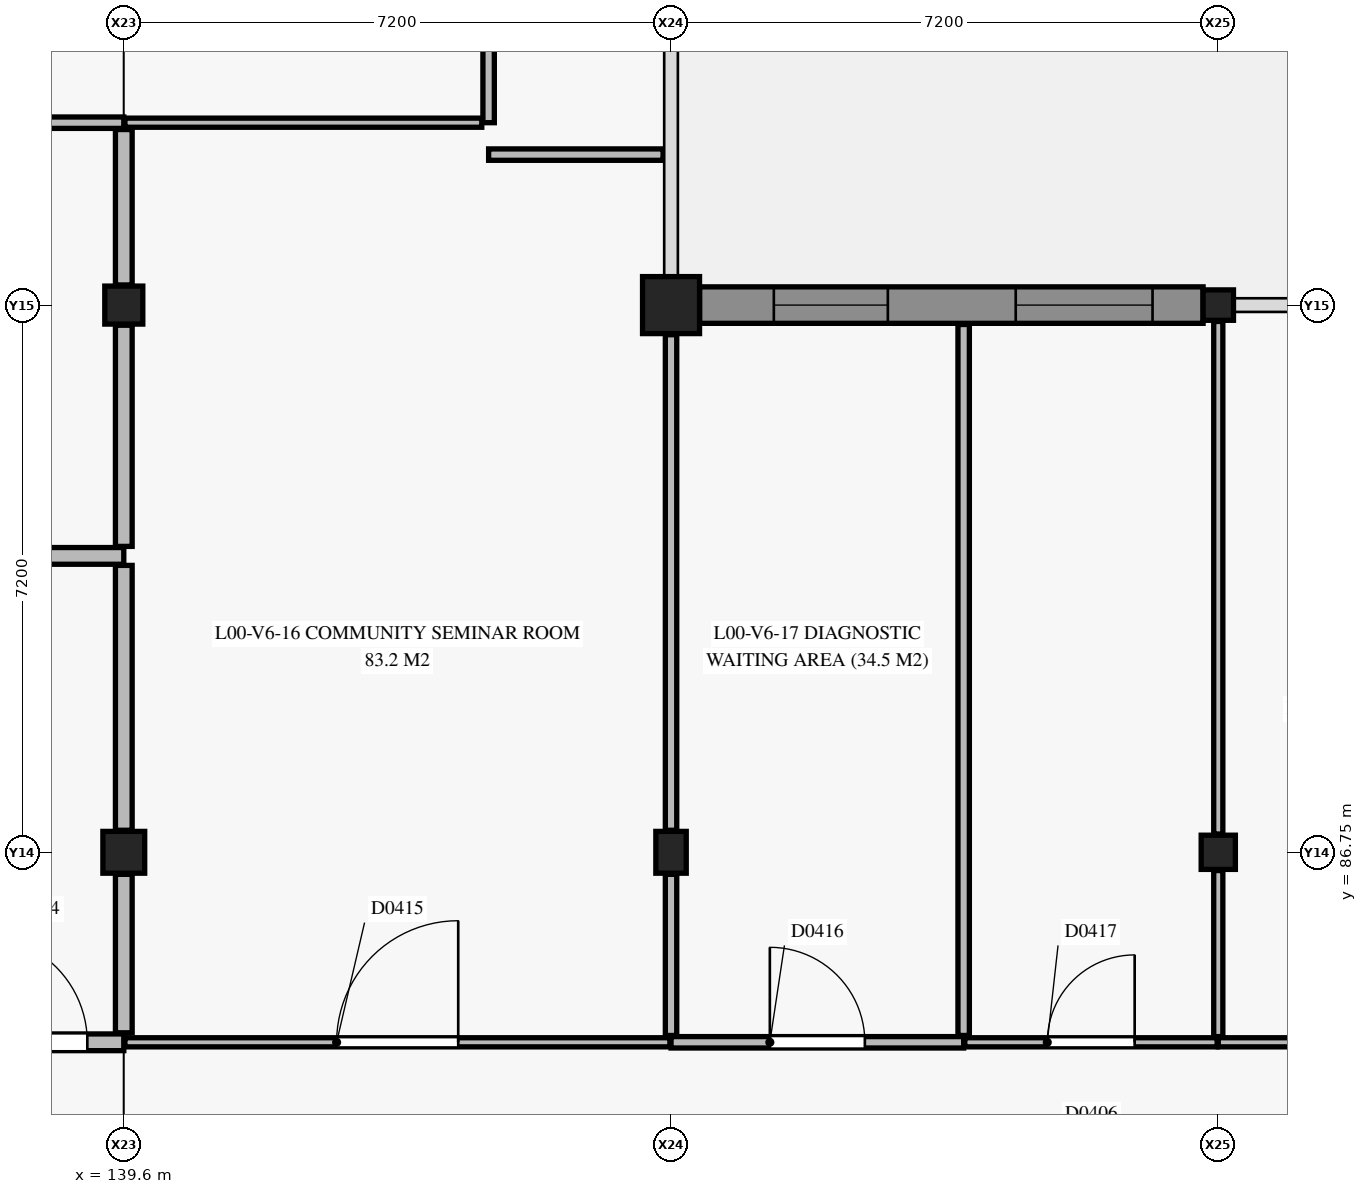
"""IFC4 building model, lengths in metres.
Left out: names, types, materials, properties, quantities, classifications, styles, units other than length and angle.
Written with IfcOpenShell. Run it as: python <this file> out.ifc"""

import sys

from ifc_helpers import new_model, si_unit, direction, frame, frame_2d, origin, origin_2d, place, context, subcontext, project, spatial, rectangle, extrude, element, fill, save


model = new_model("IFC4")
c1 = context("Model", 3, precision=1e-05, world=origin(), true_north=direction((0.0, 1.0)))
c2 = subcontext(c1, "Body", "Model", "MODEL_VIEW")
j1 = project(units=[si_unit("LENGTHUNIT", "METRE"), si_unit("PLANEANGLEUNIT", "RADIAN")], contexts=[c1])
p1 = place(None, origin())
s1 = spatial("IfcSite", under=j1, at=p1, CompositionType="ELEMENT")
p2 = place(p1, origin())
s2 = spatial("IfcBuilding", under=s1, at=p2, CompositionType="ELEMENT")
p3 = place(p2, origin())
s3 = spatial("IfcBuildingStorey", under=s2, at=p3, CompositionType="ELEMENT", Elevation=0.0)
p4 = place(p3, frame((139.6, 86.75, 0.0), z_axis=(0.0, 0.0, 1.0), x_axis=(1.0, 0.0, 0.0)))
e1 = element("IfcColumn", 1, at=p4, inside=s3, PredefinedType="COLUMN", context=c2, shape_type="SweptSolid", body=[
    extrude(rectangle(XDim=0.55, YDim=0.55, at=origin_2d()), origin(), (0.0, 0.0, 1.0), 4.8),
])
p5 = place(p3, frame((139.6, 93.95, 0.0), z_axis=(0.0, 0.0, 1.0), x_axis=(1.0, 0.0, 0.0)))
e2 = element("IfcColumn", 2, at=p5, inside=s3, PredefinedType="COLUMN", context=c2, shape_type="SweptSolid", body=[
    extrude(rectangle(XDim=0.5, YDim=0.5, at=origin_2d()), origin(), (0.0, 0.0, 1.0), 4.8),
])
p6 = place(p3, frame((146.8, 86.75, 0.0), z_axis=(0.0, 0.0, 1.0), x_axis=(1.0, 0.0, 0.0)))
e3 = element("IfcColumn", 3, at=p6, inside=s3, PredefinedType="COLUMN", context=c2, shape_type="SweptSolid", body=[
    extrude(rectangle(XDim=0.4, YDim=0.55, at=origin_2d()), origin(), (0.0, 0.0, 1.0), 4.8),
])
p7 = place(p3, frame((146.8, 93.95, 0.0), z_axis=(0.0, 0.0, 1.0), x_axis=(1.0, 0.0, 0.0)))
e4 = element("IfcColumn", 4, at=p7, inside=s3, PredefinedType="COLUMN", context=c2, shape_type="SweptSolid", body=[
    extrude(rectangle(XDim=0.75, YDim=0.75, at=origin_2d()), origin(), (0.0, 0.0, 1.0), 4.8),
])
p8 = place(p3, frame((154.0, 86.75, 0.0), z_axis=(0.0, 0.0, 1.0), x_axis=(1.0, 0.0, 0.0)))
e5 = element("IfcColumn", 5, at=p8, inside=s3, PredefinedType="COLUMN", context=c2, shape_type="SweptSolid", body=[
    extrude(rectangle(XDim=0.45, YDim=0.45, at=origin_2d()), origin(), (0.0, 0.0, 1.0), 4.8),
])
p9 = place(p3, frame((154.0, 93.95, 0.0), z_axis=(0.0, 0.0, 1.0), x_axis=(1.0, 0.0, 0.0)))
e6 = element("IfcColumn", 6, at=p9, inside=s3, PredefinedType="COLUMN", context=c2, shape_type="SweptSolid", body=[
    extrude(rectangle(XDim=0.4, YDim=0.4, at=origin_2d()), origin(), (0.0, 0.0, 1.0), 4.8),
])
p10 = place(p3, frame((147.175, 93.95, 0.0), z_axis=(0.0, 0.0, 1.0), x_axis=(1.0, 0.0, 0.0)))
e7 = element("IfcWall", 7, at=p10, inside=s3, PredefinedType="SOLIDWALL", context=c2, shape_type="SweptSolid", body=[
    extrude(rectangle(XDim=6.625, YDim=0.48, at=frame_2d((3.312, 0.0))), origin(), (0.0, 0.0, 1.0), 3.7),
])
p11 = place(p10, frame((0.978, 0.0, 0.9)))
e8 = element("IfcOpeningElement", 8, at=p11, cuts=e7, PredefinedType="OPENING", context=c2, shape_type="SweptSolid", body=[
    extrude(rectangle(XDim=1.5, YDim=1.5, at=frame_2d((0.75, 0.75))), frame((0.0, 0.25, 0.0), z_axis=(0.0, -1.0, 0.0), x_axis=(1.0, 0.0, 0.0)), (0.0, 0.0, 1.0), 0.5),
])
p12 = place(p10, frame((4.16, 0.0, 0.9)))
e9 = element("IfcOpeningElement", 9, at=p12, cuts=e7, PredefinedType="OPENING", context=c2, shape_type="SweptSolid", body=[
    extrude(rectangle(XDim=1.8, YDim=1.5, at=frame_2d((0.9, 0.75))), frame((0.0, 0.25, 0.0), z_axis=(0.0, -1.0, 0.0), x_axis=(1.0, 0.0, 0.0)), (0.0, 0.0, 1.0), 0.5),
])
p13 = place(p3, frame((137.24, 84.25, 0.0), z_axis=(0.0, 0.0, 1.0), x_axis=(1.0, 0.0, 0.0)))
e10 = element("IfcWall", 10, at=p13, inside=s3, PredefinedType="PARTITIONING", context=c2, shape_type="SweptSolid", body=[
    extrude(rectangle(XDim=2.36, YDim=0.22, at=frame_2d((1.18, 0.0))), origin(), (0.0, 0.0, 1.0), 3.805),
])
p14 = place(p13, frame((0.48, 0.0, 0.0)))
e11 = element("IfcOpeningElement", 11, at=p14, cuts=e10, PredefinedType="OPENING", context=c2, shape_type="SweptSolid", body=[
    extrude(rectangle(XDim=1.4, YDim=2.2, at=frame_2d((0.7, 1.1))), frame((0.0, 0.12, 0.0), z_axis=(0.0, -1.0, 0.0), x_axis=(1.0, 0.0, 0.0)), (0.0, 0.0, 1.0), 0.24),
])
p15 = place(p3, frame((146.8, 84.25, 0.0), z_axis=(0.0, 0.0, 1.0), x_axis=(1.0, 0.0, 0.0)))
e12 = element("IfcWall", 12, at=p15, inside=s3, PredefinedType="PARTITIONING", context=c2, shape_type="SweptSolid", body=[
    extrude(rectangle(XDim=3.85, YDim=0.15, at=frame_2d((1.925, 0.0))), origin(), (0.0, 0.0, 1.0), 3.955),
])
p16 = place(p15, frame((1.3, 0.0, 0.0)))
e13 = element("IfcOpeningElement", 13, at=p16, cuts=e12, PredefinedType="OPENING", context=c2, shape_type="SweptSolid", body=[
    extrude(rectangle(XDim=1.25, YDim=2.15, at=frame_2d((0.625, 1.075))), frame((0.0, 0.085, 0.0), z_axis=(0.0, -1.0, 0.0), x_axis=(1.0, 0.0, 0.0)), (0.0, 0.0, 1.0), 0.17),
])
p17 = place(p3, frame((132.4, 96.35, 0.0), z_axis=(0.0, 0.0, 1.0), x_axis=(1.0, 0.0, 0.0)))
e14 = element("IfcWall", 14, at=p17, inside=s3, PredefinedType="PARTITIONING", context=c2, shape_type="SweptSolid", body=[
    extrude(rectangle(XDim=7.2, YDim=0.15, at=frame_2d((3.6, 0.0))), origin(), (0.0, 0.0, 1.0), 3.705),
])
p18 = place(p17, frame((3.125, 0.0, 0.0)))
e15 = element("IfcOpeningElement", 15, at=p18, cuts=e14, PredefinedType="OPENING", context=c2, shape_type="SweptSolid", body=[
    extrude(rectangle(XDim=0.95, YDim=2.1, at=frame_2d((0.475, 1.05))), frame((0.0, 0.085, 0.0), z_axis=(0.0, -1.0, 0.0), x_axis=(1.0, 0.0, 0.0)), (0.0, 0.0, 1.0), 0.17),
])
p19 = place(p3, frame((144.4, 96.35, 0.0), z_axis=(0.0, 0.0, 1.0), x_axis=(0.0, 1.0, 0.0)))
e16 = element("IfcWall", 16, at=p19, inside=s3, PredefinedType="PARTITIONING", context=c2, shape_type="SweptSolid", body=[
    extrude(rectangle(XDim=2.4, YDim=0.15, at=frame_2d((1.2, 0.0))), origin(), (0.0, 0.0, 1.0), 4.045),
])
p20 = place(p3, frame((154.0, 84.25, 0.0), z_axis=(0.0, 0.0, 1.0), x_axis=(1.0, 0.0, 0.0)))
e17 = element("IfcWall", 17, at=p20, inside=s3, PredefinedType="PARTITIONING", context=c2, shape_type="SweptSolid", body=[
    extrude(rectangle(XDim=4.8, YDim=0.12, at=frame_2d((2.4, 0.0))), origin(), (0.0, 0.0, 1.0), 3.925),
])
p21 = place(p20, frame((1.9, 0.0, 0.0)))
e18 = element("IfcOpeningElement", 18, at=p21, cuts=e17, PredefinedType="OPENING", context=c2, shape_type="SweptSolid", body=[
    extrude(rectangle(XDim=1.0, YDim=2.15, at=frame_2d((0.5, 1.075))), frame((0.0, 0.07, 0.0), z_axis=(0.0, -1.0, 0.0), x_axis=(1.0, 0.0, 0.0)), (0.0, 0.0, 1.0), 0.14),
])
p22 = place(p3, frame((139.615, 84.25, 0.0), z_axis=(0.0, 0.0, 1.0), x_axis=(1.0, 0.0, 0.0)))
e19 = element("IfcWall", 19, at=p22, inside=s3, PredefinedType="PARTITIONING", context=c2, shape_type="SweptSolid", body=[
    extrude(rectangle(XDim=7.17, YDim=0.12, at=frame_2d((3.585, 0.0))), origin(), (0.0, 0.0, 1.0), 3.805),
])
p23 = place(p22, frame((2.785, 0.0, 0.0)))
e20 = element("IfcOpeningElement", 20, at=p23, cuts=e19, PredefinedType="OPENING", context=c2, shape_type="SweptSolid", body=[
    extrude(rectangle(XDim=1.6, YDim=2.25, at=frame_2d((0.8, 1.125))), frame((0.0, 0.07, 0.0), z_axis=(0.0, -1.0, 0.0), x_axis=(1.0, 0.0, 0.0)), (0.0, 0.0, 1.0), 0.14),
])
p24 = place(p3, frame((139.615, 96.35, 0.0), z_axis=(0.0, 0.0, 1.0), x_axis=(1.0, 0.0, 0.0)))
e21 = element("IfcWall", 21, at=p24, inside=s3, PredefinedType="PARTITIONING", context=c2, shape_type="SweptSolid", body=[
    extrude(rectangle(XDim=4.695, YDim=0.12, at=frame_2d((2.348, 0.0))), origin(), (0.0, 0.0, 1.0), 3.925),
])
p25 = place(p3, frame((150.665, 84.25, 0.0), z_axis=(0.0, 0.0, 1.0), x_axis=(1.0, 0.0, 0.0)))
e22 = element("IfcWall", 22, at=p25, inside=s3, PredefinedType="PARTITIONING", context=c2, shape_type="SweptSolid", body=[
    extrude(rectangle(XDim=3.32, YDim=0.12, at=frame_2d((1.66, 0.0))), origin(), (0.0, 0.0, 1.0), 3.925),
])
p26 = place(p25, frame((1.085, 0.0, 0.0)))
e23 = element("IfcOpeningElement", 23, at=p26, cuts=e22, PredefinedType="OPENING", context=c2, shape_type="SweptSolid", body=[
    extrude(rectangle(XDim=1.15, YDim=2.15, at=frame_2d((0.575, 1.075))), frame((0.0, 0.07, 0.0), z_axis=(0.0, -1.0, 0.0), x_axis=(1.0, 0.0, 0.0)), (0.0, 0.0, 1.0), 0.14),
])
p27 = place(p3, frame((137.24, 90.65, 0.0), z_axis=(0.0, 0.0, 1.0), x_axis=(1.0, 0.0, 0.0)))
e24 = element("IfcWall", 24, at=p27, inside=s3, PredefinedType="PARTITIONING", context=c2, shape_type="SweptSolid", body=[
    extrude(rectangle(XDim=2.36, YDim=0.22, at=frame_2d((1.18, 0.0))), origin(), (0.0, 0.0, 1.0), 3.925),
])
p28 = place(p3, frame((139.6, 84.375, 0.0), z_axis=(0.0, 0.0, 1.0), x_axis=(0.0, 1.0, 0.0)))
e25 = element("IfcWall", 25, at=p28, inside=s3, PredefinedType="PARTITIONING", context=c2, shape_type="SweptSolid", body=[
    extrude(rectangle(XDim=2.085, YDim=0.22, at=frame_2d((1.042, 0.0))), origin(), (0.0, 0.0, 1.0), 3.805),
])
p29 = place(p3, frame((139.6, 87.04, 0.0), z_axis=(0.0, 0.0, 1.0), x_axis=(0.0, 1.0, 0.0)))
e26 = element("IfcWall", 26, at=p29, inside=s3, PredefinedType="PARTITIONING", context=c2, shape_type="SweptSolid", body=[
    extrude(rectangle(XDim=3.485, YDim=0.22, at=frame_2d((1.742, 0.0))), origin(), (0.0, 0.0, 1.0), 3.925),
])
p30 = place(p3, frame((139.6, 90.775, 0.0), z_axis=(0.0, 0.0, 1.0), x_axis=(0.0, 1.0, 0.0)))
e27 = element("IfcWall", 27, at=p30, inside=s3, PredefinedType="PARTITIONING", context=c2, shape_type="SweptSolid", body=[
    extrude(rectangle(XDim=2.91, YDim=0.22, at=frame_2d((1.455, 0.0))), origin(), (0.0, 0.0, 1.0), 3.925),
])
p31 = place(p3, frame((139.6, 94.215, 0.0), z_axis=(0.0, 0.0, 1.0), x_axis=(0.0, 1.0, 0.0)))
e28 = element("IfcWall", 28, at=p31, inside=s3, PredefinedType="PARTITIONING", context=c2, shape_type="SweptSolid", body=[
    extrude(rectangle(XDim=2.045, YDim=0.22, at=frame_2d((1.022, 0.0))), origin(), (0.0, 0.0, 1.0), 3.925),
])
p32 = place(p3, frame((146.8, 84.34, 0.0), z_axis=(0.0, 0.0, 1.0), x_axis=(0.0, 1.0, 0.0)))
e29 = element("IfcWall", 29, at=p32, inside=s3, PredefinedType="PARTITIONING", context=c2, shape_type="SweptSolid", body=[
    extrude(rectangle(XDim=2.12, YDim=0.15, at=frame_2d((1.06, 0.0))), origin(), (0.0, 0.0, 1.0), 3.955),
])
p33 = place(p3, frame((146.8, 87.04, 0.0), z_axis=(0.0, 0.0, 1.0), x_axis=(0.0, 1.0, 0.0)))
e30 = element("IfcWall", 30, at=p33, inside=s3, PredefinedType="PARTITIONING", context=c2, shape_type="SweptSolid", body=[
    extrude(rectangle(XDim=6.52, YDim=0.15, at=frame_2d((3.26, 0.0))), origin(), (0.0, 0.0, 1.0), 3.705),
])
p34 = place(p3, frame((144.4, 95.93, 0.0), z_axis=(0.0, 0.0, 1.0), x_axis=(1.0, 0.0, 0.0)))
e31 = element("IfcWall", 31, at=p34, inside=s3, PredefinedType="PARTITIONING", context=c2, shape_type="SweptSolid", body=[
    extrude(rectangle(XDim=2.295, YDim=0.15, at=frame_2d((1.147, 0.0))), origin(), (0.0, 0.0, 1.0), 3.805),
])
p35 = place(p3, frame((150.65, 84.34, 0.0), z_axis=(0.0, 0.0, 1.0), x_axis=(0.0, 1.0, 0.0)))
e32 = element("IfcWall", 32, at=p35, inside=s3, PredefinedType="PARTITIONING", context=c2, shape_type="SweptSolid", body=[
    extrude(rectangle(XDim=9.355, YDim=0.15, at=frame_2d((4.677, 0.0))), origin(), (0.0, 0.0, 1.0), 3.705),
])
p36 = place(p3, frame((154.0, 84.325, 0.0), z_axis=(0.0, 0.0, 1.0), x_axis=(0.0, 1.0, 0.0)))
e33 = element("IfcWall", 33, at=p36, inside=s3, PredefinedType="PARTITIONING", context=c2, shape_type="SweptSolid", body=[
    extrude(rectangle(XDim=2.185, YDim=0.12, at=frame_2d((1.093, 0.0))), origin(), (0.0, 0.0, 1.0), 3.925),
])
p37 = place(p3, frame((154.0, 86.99, 0.0), z_axis=(0.0, 0.0, 1.0), x_axis=(0.0, 1.0, 0.0)))
e34 = element("IfcWall", 34, at=p37, inside=s3, PredefinedType="PARTITIONING", context=c2, shape_type="SweptSolid", body=[
    extrude(rectangle(XDim=6.745, YDim=0.12, at=frame_2d((3.373, 0.0))), origin(), (0.0, 0.0, 1.0), 3.925),
])
p38 = place(p11, origin())
e35 = element("IfcWindow", 35, at=p38, inside=s3, PartitioningType="SINGLE_PANEL", PredefinedType="WINDOW", context=c2, shape_type="SweptSolid", body=[
    extrude(rectangle(XDim=1.5, YDim=1.5, at=frame_2d((0.75, 0.75))), frame((0.0, 0.03, 0.0), z_axis=(0.0, -1.0, 0.0), x_axis=(1.0, 0.0, 0.0)), (0.0, 0.0, 1.0), 0.06),
])
fill(e8, e35)
p39 = place(p12, origin())
e36 = element("IfcWindow", 36, at=p39, inside=s3, PartitioningType="SINGLE_PANEL", PredefinedType="WINDOW", context=c2, shape_type="SweptSolid", body=[
    extrude(rectangle(XDim=1.8, YDim=1.5, at=frame_2d((0.9, 0.75))), frame((0.0, 0.03, 0.0), z_axis=(0.0, -1.0, 0.0), x_axis=(1.0, 0.0, 0.0)), (0.0, 0.0, 1.0), 0.06),
])
fill(e9, e36)
p40 = place(p14, origin())
e37 = element("IfcDoor", 37, at=p40, inside=s3, OperationType="SINGLE_SWING_LEFT", PredefinedType="DOOR", context=c2, shape_type="SweptSolid", body=[
    extrude(rectangle(XDim=1.4, YDim=2.2, at=frame_2d((0.7, 1.1))), frame((0.0, 0.025, 0.0), z_axis=(0.0, -1.0, 0.0), x_axis=(1.0, 0.0, 0.0)), (0.0, 0.0, 1.0), 0.05),
])
fill(e11, e37)
p41 = place(p23, origin())
e38 = element("IfcDoor", 38, at=p41, inside=s3, OperationType="SINGLE_SWING_RIGHT", PredefinedType="DOOR", context=c2, shape_type="SweptSolid", body=[
    extrude(rectangle(XDim=1.6, YDim=2.25, at=frame_2d((0.8, 1.125))), frame((0.0, 0.025, 0.0), z_axis=(0.0, -1.0, 0.0), x_axis=(1.0, 0.0, 0.0)), (0.0, 0.0, 1.0), 0.05),
])
fill(e20, e38)
p42 = place(p16, origin())
e39 = element("IfcDoor", 39, at=p42, inside=s3, OperationType="SINGLE_SWING_LEFT", PredefinedType="DOOR", context=c2, shape_type="SweptSolid", body=[
    extrude(rectangle(XDim=1.25, YDim=2.15, at=frame_2d((0.625, 1.075))), frame((0.0, 0.025, 0.0), z_axis=(0.0, -1.0, 0.0), x_axis=(1.0, 0.0, 0.0)), (0.0, 0.0, 1.0), 0.05),
])
fill(e13, e39)
p43 = place(p26, origin())
e40 = element("IfcDoor", 40, at=p43, inside=s3, OperationType="SINGLE_SWING_RIGHT", PredefinedType="DOOR", context=c2, shape_type="SweptSolid", body=[
    extrude(rectangle(XDim=1.15, YDim=2.15, at=frame_2d((0.575, 1.075))), frame((0.0, 0.025, 0.0), z_axis=(0.0, -1.0, 0.0), x_axis=(1.0, 0.0, 0.0)), (0.0, 0.0, 1.0), 0.05),
])
fill(e23, e40)
save(model, sys.argv[1])
